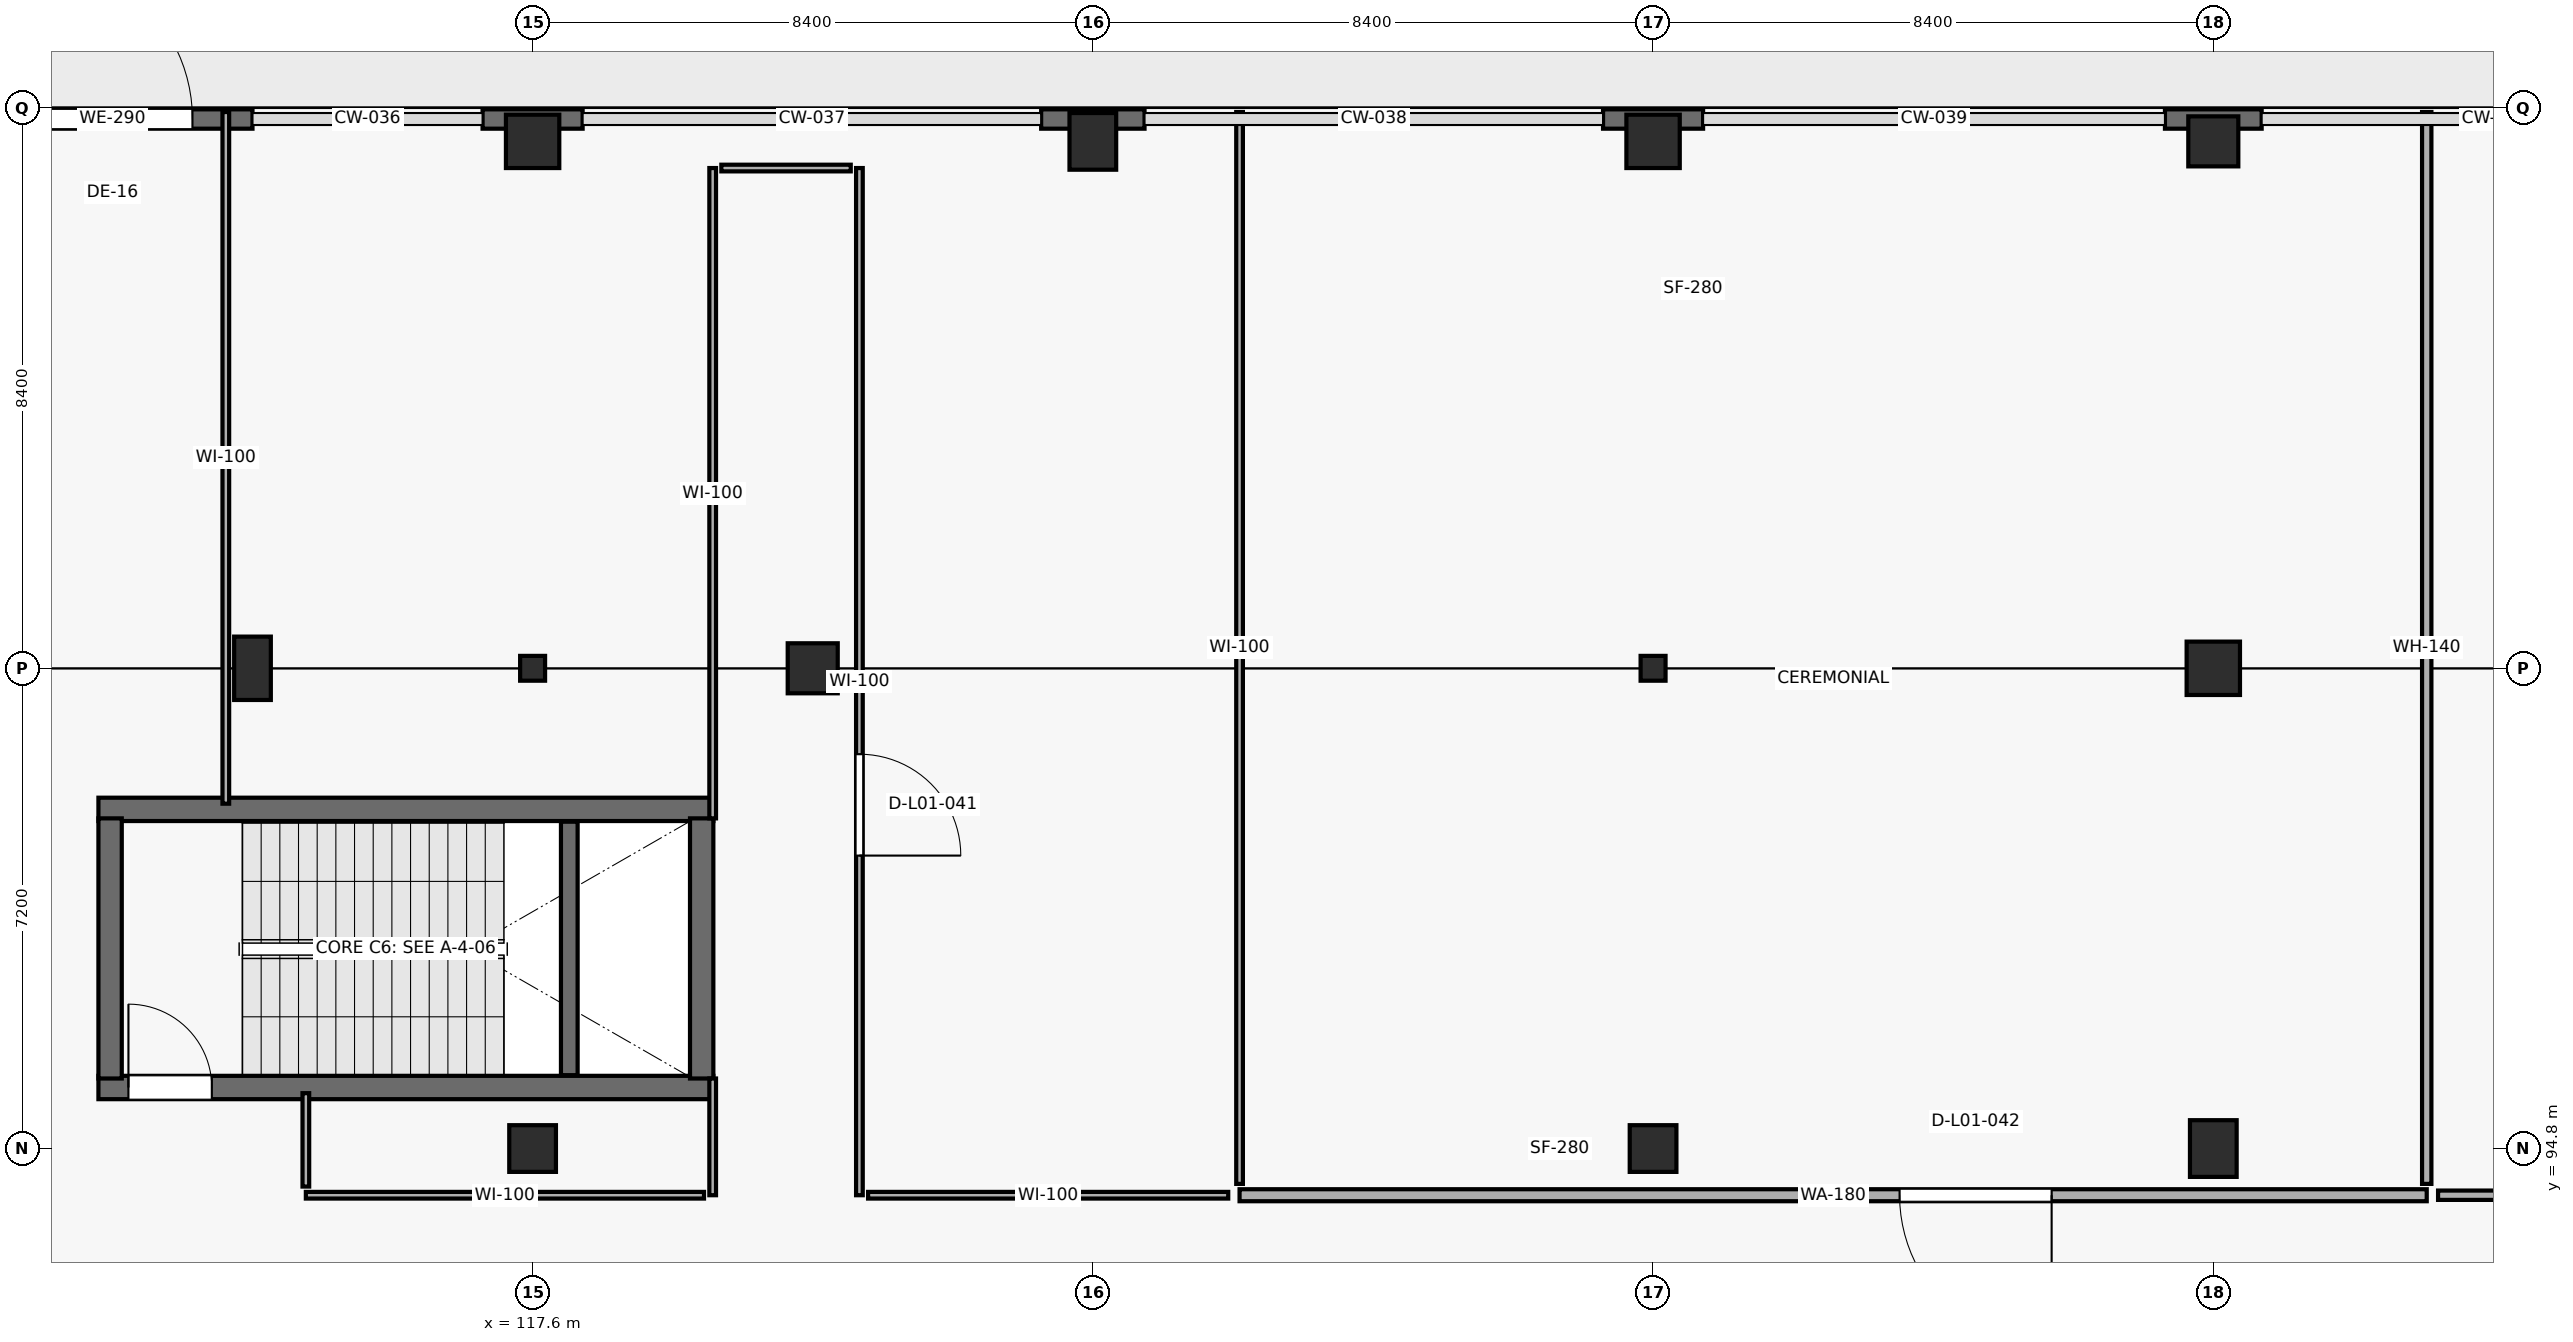
"""IFC4 building model, lengths in metres.
Left out: names, types, materials, properties, quantities, classifications, styles, units other than length and angle.
Written with IfcOpenShell. Run it as: python <this file> out.ifc"""

import sys

from ifc_helpers import new_model, si_unit, direction, frame, frame_2d, origin, origin_2d, place, context, subcontext, project, spatial, rectangle, circle, i_section, extrude, element, fill, save


model = new_model("IFC4")
c1 = context("Model", 3, precision=1e-05, world=origin(), true_north=direction((0.0, 1.0)))
c2 = subcontext(c1, "Body", "Model", "MODEL_VIEW")
j1 = project(units=[si_unit("LENGTHUNIT", "METRE"), si_unit("PLANEANGLEUNIT", "RADIAN")], contexts=[c1])
p1 = place(None, origin())
s1 = spatial("IfcSite", under=j1, at=p1, CompositionType="ELEMENT")
p2 = place(p1, origin())
s2 = spatial("IfcBuilding", under=s1, at=p2, CompositionType="ELEMENT")
p3 = place(p2, origin())
s3 = spatial("IfcBuildingStorey", under=s2, at=p3, CompositionType="ELEMENT", Elevation=0.0)
p4 = place(p3, frame((117.6, 94.8, 0.0), z_axis=(0.0, 0.0, 1.0), x_axis=(1.0, 0.0, 0.0)))
e1 = element("IfcColumn", 1, at=p4, inside=s3, PredefinedType="COLUMN", context=c2, shape_type="SweptSolid", body=[
    extrude(rectangle(XDim=0.7, YDim=0.7, at=origin_2d()), origin(), (0.0, 0.0, 1.0), 5.4),
])
p5 = place(p3, frame((117.6, 102.0, 0.0), z_axis=(0.0, 0.0, 1.0), x_axis=(1.0, 0.0, 0.0)))
e2 = element("IfcColumn", 2, at=p5, inside=s3, PredefinedType="COLUMN", context=c2, shape_type="SweptSolid", body=[
    extrude(i_section(OverallWidth=0.374, OverallDepth=0.372, WebThickness=0.016, FlangeThickness=0.026, at=origin_2d()), origin(), (0.0, 0.0, 1.0), 5.4),
])
p6 = place(p3, frame((117.6, 109.9, 0.0), z_axis=(0.0, 0.0, 1.0), x_axis=(1.0, 0.0, 0.0)))
e3 = element("IfcColumn", 3, at=p6, inside=s3, PredefinedType="COLUMN", context=c2, shape_type="SweptSolid", body=[
    extrude(rectangle(XDim=0.8, YDim=0.8, at=origin_2d()), origin(), (0.0, 0.0, 1.0), 5.4),
])
p7 = place(p3, frame((126.0, 109.9, 0.0), z_axis=(0.0, 0.0, 1.0), x_axis=(1.0, 0.0, 0.0)))
e4 = element("IfcColumn", 4, at=p7, inside=s3, PredefinedType="COLUMN", context=c2, shape_type="SweptSolid", body=[
    extrude(rectangle(XDim=0.7, YDim=0.85, at=origin_2d()), origin(), (0.0, 0.0, 1.0), 5.4),
])
p8 = place(p3, frame((134.4, 94.8, 0.0), z_axis=(0.0, 0.0, 1.0), x_axis=(1.0, 0.0, 0.0)))
e5 = element("IfcColumn", 5, at=p8, inside=s3, PredefinedType="COLUMN", context=c2, shape_type="SweptSolid", body=[
    extrude(rectangle(XDim=0.7, YDim=0.7, at=origin_2d()), origin(), (0.0, 0.0, 1.0), 5.4),
])
p9 = place(p3, frame((134.4, 102.0, 0.0), z_axis=(0.0, 0.0, 1.0), x_axis=(1.0, 0.0, 0.0)))
e6 = element("IfcColumn", 6, at=p9, inside=s3, PredefinedType="COLUMN", context=c2, shape_type="SweptSolid", body=[
    extrude(i_section(OverallWidth=0.374, OverallDepth=0.372, WebThickness=0.016, FlangeThickness=0.026, at=origin_2d()), origin(), (0.0, 0.0, 1.0), 5.4),
])
p10 = place(p3, frame((134.4, 109.9, 0.0), z_axis=(0.0, 0.0, 1.0), x_axis=(1.0, 0.0, 0.0)))
e7 = element("IfcColumn", 7, at=p10, inside=s3, PredefinedType="COLUMN", context=c2, shape_type="SweptSolid", body=[
    extrude(rectangle(XDim=0.8, YDim=0.8, at=origin_2d()), origin(), (0.0, 0.0, 1.0), 5.4),
])
p11 = place(p3, frame((142.8, 94.8, 0.0), z_axis=(0.0, 0.0, 1.0), x_axis=(1.0, 0.0, 0.0)))
e8 = element("IfcColumn", 8, at=p11, inside=s3, PredefinedType="COLUMN", context=c2, shape_type="SweptSolid", body=[
    extrude(rectangle(XDim=0.7, YDim=0.85, at=origin_2d()), origin(), (0.0, 0.0, 1.0), 5.4),
])
p12 = place(p3, frame((142.8, 102.0, 0.0), z_axis=(0.0, 0.0, 1.0), x_axis=(1.0, 0.0, 0.0)))
e9 = element("IfcColumn", 9, at=p12, inside=s3, PredefinedType="COLUMN", context=c2, shape_type="SweptSolid", body=[
    extrude(rectangle(XDim=0.8, YDim=0.8, at=origin_2d()), origin(), (0.0, 0.0, 1.0), 5.4),
])
p13 = place(p3, frame((142.8, 109.9, 0.0), z_axis=(0.0, 0.0, 1.0), x_axis=(1.0, 0.0, 0.0)))
e10 = element("IfcColumn", 10, at=p13, inside=s3, PredefinedType="COLUMN", context=c2, shape_type="SweptSolid", body=[
    extrude(rectangle(XDim=0.75, YDim=0.75, at=origin_2d()), origin(), (0.0, 0.0, 1.0), 5.4),
])
p14 = place(p3, frame((113.4, 102.0, 0.0), z_axis=(0.0, 0.0, 1.0), x_axis=(1.0, 0.0, 0.0)))
e11 = element("IfcColumn", 11, at=p14, inside=s3, PredefinedType="PILASTER", context=c2, shape_type="SweptSolid", body=[
    extrude(rectangle(XDim=0.55, YDim=0.95, at=origin_2d()), origin(), (0.0, 0.0, 1.0), 5.4),
])
p15 = place(p3, frame((121.8, 102.0, 0.0), z_axis=(0.0, 0.0, 1.0), x_axis=(1.0, 0.0, 0.0)))
e12 = element("IfcColumn", 12, at=p15, inside=s3, PredefinedType="PILASTER", context=c2, shape_type="SweptSolid", body=[
    extrude(circle(Radius=0.375, at=origin_2d()), origin(), (0.0, 0.0, 1.0), 5.4),
])
p16 = place(p3, frame((109.2, 110.235, 0.0), z_axis=(0.0, 0.0, 1.0), x_axis=(1.0, 0.0, 0.0)))
e13 = element("IfcWall", 13, at=p16, inside=s3, PredefinedType="SOLIDWALL", context=c2, shape_type="SweptSolid", body=[
    extrude(rectangle(XDim=4.2, YDim=0.29, at=frame_2d((2.1, 0.0))), origin(), (0.0, 0.0, 1.0), 5.12),
])
p17 = place(p16, frame((0.9, 0.0, 0.0)))
e14 = element("IfcOpeningElement", 14, at=p17, cuts=e13, PredefinedType="OPENING", context=c2, shape_type="SweptSolid", body=[
    extrude(rectangle(XDim=2.4, YDim=2.7, at=frame_2d((1.2, 1.35))), frame((0.0, 0.155, 0.0), z_axis=(0.0, -1.0, 0.0), x_axis=(1.0, 0.0, 0.0)), (0.0, 0.0, 1.0), 0.31),
])
p18 = place(p3, frame((116.85, 110.235, 0.0), z_axis=(0.0, 0.0, 1.0), x_axis=(1.0, 0.0, 0.0)))
e15 = element("IfcWall", 15, at=p18, inside=s3, PredefinedType="SOLIDWALL", context=c2, shape_type="SweptSolid", body=[
    extrude(rectangle(XDim=1.5, YDim=0.29, at=frame_2d((0.75, 0.0))), origin(), (0.0, 0.0, 1.0), 5.12),
])
p19 = place(p3, frame((125.225, 110.235, 0.0), z_axis=(0.0, 0.0, 1.0), x_axis=(1.0, 0.0, 0.0)))
e16 = element("IfcWall", 16, at=p19, inside=s3, PredefinedType="SOLIDWALL", context=c2, shape_type="SweptSolid", body=[
    extrude(rectangle(XDim=1.55, YDim=0.29, at=frame_2d((0.775, 0.0))), origin(), (0.0, 0.0, 1.0), 5.12),
])
p20 = place(p3, frame((133.65, 110.235, 0.0), z_axis=(0.0, 0.0, 1.0), x_axis=(1.0, 0.0, 0.0)))
e17 = element("IfcWall", 17, at=p20, inside=s3, PredefinedType="SOLIDWALL", context=c2, shape_type="SweptSolid", body=[
    extrude(rectangle(XDim=1.5, YDim=0.29, at=frame_2d((0.75, 0.0))), origin(), (0.0, 0.0, 1.0), 5.12),
])
p21 = place(p3, frame((142.075, 110.235, 0.0), z_axis=(0.0, 0.0, 1.0), x_axis=(1.0, 0.0, 0.0)))
e18 = element("IfcWall", 18, at=p21, inside=s3, PredefinedType="SOLIDWALL", context=c2, shape_type="SweptSolid", body=[
    extrude(rectangle(XDim=1.45, YDim=0.29, at=frame_2d((0.725, 0.0))), origin(), (0.0, 0.0, 1.0), 5.12),
])
p22 = place(p3, frame((111.09, 95.715, 0.0), z_axis=(0.0, 0.0, 1.0), x_axis=(1.0, 0.0, 0.0)))
e19 = element("IfcWall", 19, at=p22, inside=s3, PredefinedType="SHEAR", context=c2, shape_type="SweptSolid", body=[
    extrude(rectangle(XDim=9.22, YDim=0.35, at=frame_2d((4.61, 0.0))), origin(), (0.0, 0.0, 1.0), 5.12),
])
p23 = place(p22, frame((0.45, 0.0, 0.0)))
e20 = element("IfcOpeningElement", 20, at=p23, cuts=e19, PredefinedType="OPENING", context=c2, shape_type="SweptSolid", body=[
    extrude(rectangle(XDim=1.25, YDim=2.2, at=frame_2d((0.625, 1.1))), frame((0.0, 0.185, 0.0), z_axis=(0.0, -1.0, 0.0), x_axis=(1.0, 0.0, 0.0)), (0.0, 0.0, 1.0), 0.37),
])
p24 = place(p3, frame((120.31, 99.885, 0.0), z_axis=(0.0, 0.0, 1.0), x_axis=(-1.0, 0.0, 0.0)))
e21 = element("IfcWall", 21, at=p24, inside=s3, PredefinedType="SHEAR", context=c2, shape_type="SweptSolid", body=[
    extrude(rectangle(XDim=9.22, YDim=0.35, at=frame_2d((4.61, 0.0))), origin(), (0.0, 0.0, 1.0), 5.12),
])
for number, where, z_axis, x_axis in (
    (22, (111.265, 95.85, 0.0), (0.0, 0.0, 1.0), (0.0, 1.0, 0.0)),
    (23, (120.135, 99.75, 0.0), (0.0, 0.0, 1.0), (0.0, -1.0, 0.0)),
):
    element("IfcWall", number, at=place(p3, frame(where, z_axis=z_axis, x_axis=x_axis)), inside=s3, PredefinedType="SHEAR", context=c2, shape_type="SweptSolid", body=[
        extrude(rectangle(XDim=3.9, YDim=0.35, at=frame_2d((1.95, 0.0))), origin(), (0.0, 0.0, 1.0), 5.12),
    ])
p25 = place(p3, frame((118.15, 95.9, 0.0), z_axis=(0.0, 0.0, 1.0), x_axis=(0.0, 1.0, 0.0)))
e24 = element("IfcWall", 24, at=p25, inside=s3, PredefinedType="SHEAR", context=c2, shape_type="SweptSolid", body=[
    extrude(rectangle(XDim=3.8, YDim=0.25, at=frame_2d((1.9, 0.0))), origin(), (0.0, 0.0, 1.0), 2.52),
])
p26 = place(p3, frame((146.0, 94.1, 0.0), z_axis=(0.0, 0.0, 1.0), x_axis=(-1.0, 0.0, 0.0)))
e25 = element("IfcWall", 25, at=p26, inside=s3, PredefinedType="PARTITIONING", context=c2, shape_type="SweptSolid", body=[
    extrude(rectangle(XDim=17.8, YDim=0.18, at=frame_2d((8.9, 0.0))), origin(), (0.0, 0.0, 1.0), 5.12),
])
p27 = place(p26, frame((5.624, 0.0, 0.0)))
e26 = element("IfcOpeningElement", 26, at=p27, cuts=e25, PredefinedType="OPENING", context=c2, shape_type="SweptSolid", body=[
    extrude(rectangle(XDim=2.28, YDim=2.75, at=frame_2d((1.14, 1.375))), frame((0.0, 0.1, 0.0), z_axis=(0.0, -1.0, 0.0), x_axis=(1.0, 0.0, 0.0)), (0.0, 0.0, 1.0), 0.2),
])
p28 = place(p3, frame((146.0, 94.27, 0.0), z_axis=(0.0, 0.0, 1.0), x_axis=(0.0, 1.0, 0.0)))
e27 = element("IfcWall", 27, at=p28, inside=s3, PredefinedType="PARTITIONING", context=c2, shape_type="SweptSolid", body=[
    extrude(rectangle(XDim=16.07, YDim=0.14, at=frame_2d((8.035, 0.0))), origin(), (0.0, 0.0, 1.0), 5.12),
])
p29 = place(p3, frame((128.2, 110.34, 0.0), z_axis=(0.0, 0.0, 1.0), x_axis=(0.0, -1.0, 0.0)))
e28 = element("IfcWall", 28, at=p29, inside=s3, PredefinedType="PARTITIONING", context=c2, shape_type="SweptSolid", body=[
    extrude(rectangle(XDim=16.07, YDim=0.1, at=frame_2d((8.035, 0.0))), origin(), (0.0, 0.0, 1.0), 5.12),
])
p30 = place(p3, frame((122.5, 94.1, 0.0), z_axis=(0.0, 0.0, 1.0), x_axis=(0.0, 1.0, 0.0)))
e29 = element("IfcWall", 29, at=p30, inside=s3, PredefinedType="PARTITIONING", context=c2, shape_type="SweptSolid", body=[
    extrude(rectangle(XDim=15.4, YDim=0.1, at=frame_2d((7.7, 0.0))), origin(), (0.0, 0.0, 1.0), 5.12),
])
p31 = place(p30, frame((5.092, 0.0, 0.0)))
e30 = element("IfcOpeningElement", 30, at=p31, cuts=e29, PredefinedType="OPENING", context=c2, shape_type="SweptSolid", body=[
    extrude(rectangle(XDim=1.52, YDim=2.4, at=frame_2d((0.76, 1.2))), frame((0.0, 0.06, 0.0), z_axis=(0.0, -1.0, 0.0), x_axis=(1.0, 0.0, 0.0)), (0.0, 0.0, 1.0), 0.12),
])
p32 = place(p3, frame((120.3, 109.5, 0.0), z_axis=(0.0, 0.0, 1.0), x_axis=(0.0, -1.0, 0.0)))
e31 = element("IfcWall", 31, at=p32, inside=s3, PredefinedType="PARTITIONING", context=c2, shape_type="SweptSolid", body=[
    extrude(rectangle(XDim=9.75, YDim=0.1, at=frame_2d((4.875, 0.0))), origin(), (0.0, 0.0, 1.0), 5.12),
])
p33 = place(p3, frame((120.3, 95.85, 0.0), z_axis=(0.0, 0.0, 1.0), x_axis=(0.0, -1.0, 0.0)))
e32 = element("IfcWall", 32, at=p33, inside=s3, PredefinedType="PARTITIONING", context=c2, shape_type="SweptSolid", body=[
    extrude(rectangle(XDim=1.75, YDim=0.1, at=frame_2d((0.875, 0.0))), origin(), (0.0, 0.0, 1.0), 5.12),
])
p34 = place(p3, frame((159.4, 94.1, 0.0), z_axis=(0.0, 0.0, 1.0), x_axis=(-1.0, 0.0, 0.0)))
e33 = element("IfcWall", 33, at=p34, inside=s3, PredefinedType="PARTITIONING", context=c2, shape_type="SweptSolid", body=[
    extrude(rectangle(XDim=13.23, YDim=0.14, at=frame_2d((6.615, 0.0))), origin(), (0.0, 0.0, 1.0), 5.12),
])
p35 = place(p3, frame((113.0, 99.97, 0.0), z_axis=(0.0, 0.0, 1.0), x_axis=(0.0, 1.0, 0.0)))
e34 = element("IfcWall", 34, at=p35, inside=s3, PredefinedType="PARTITIONING", context=c2, shape_type="SweptSolid", body=[
    extrude(rectangle(XDim=10.37, YDim=0.1, at=frame_2d((5.185, 0.0))), origin(), (0.0, 0.0, 1.0), 5.12),
])
p36 = place(p3, frame((120.17, 94.1, 0.0), z_axis=(0.0, 0.0, 1.0), x_axis=(-1.0, 0.0, 0.0)))
e35 = element("IfcWall", 35, at=p36, inside=s3, PredefinedType="PARTITIONING", context=c2, shape_type="SweptSolid", body=[
    extrude(rectangle(XDim=5.97, YDim=0.1, at=frame_2d((2.985, 0.0))), origin(), (0.0, 0.0, 1.0), 5.12),
])
p37 = place(p3, frame((128.03, 94.1, 0.0), z_axis=(0.0, 0.0, 1.0), x_axis=(-1.0, 0.0, 0.0)))
e36 = element("IfcWall", 36, at=p37, inside=s3, PredefinedType="PARTITIONING", context=c2, shape_type="SweptSolid", body=[
    extrude(rectangle(XDim=5.4, YDim=0.1, at=frame_2d((2.7, 0.0))), origin(), (0.0, 0.0, 1.0), 5.12),
])
p38 = place(p3, frame((122.37, 109.5, 0.0), z_axis=(0.0, 0.0, 1.0), x_axis=(-1.0, 0.0, 0.0)))
e37 = element("IfcWall", 37, at=p38, inside=s3, PredefinedType="PARTITIONING", context=c2, shape_type="SweptSolid", body=[
    extrude(rectangle(XDim=1.94, YDim=0.1, at=frame_2d((0.97, 0.0))), origin(), (0.0, 0.0, 1.0), 4.36),
])
p39 = place(p3, frame((114.2, 94.23, 0.0), z_axis=(0.0, 0.0, 1.0), x_axis=(0.0, 1.0, 0.0)))
e38 = element("IfcWall", 38, at=p39, inside=s3, PredefinedType="PARTITIONING", context=c2, shape_type="SweptSolid", body=[
    extrude(rectangle(XDim=1.4, YDim=0.1, at=frame_2d((0.7, 0.0))), origin(), (0.0, 0.0, 1.0), 5.12),
])
p40 = place(p17, origin())
e39 = element("IfcDoor", 39, at=p40, inside=s3, OperationType="SINGLE_SWING_LEFT", PredefinedType="DOOR", context=c2, shape_type="SweptSolid", body=[
    extrude(rectangle(XDim=2.4, YDim=2.7, at=frame_2d((1.2, 1.35))), frame((0.0, 0.025, 0.0), z_axis=(0.0, -1.0, 0.0), x_axis=(1.0, 0.0, 0.0)), (0.0, 0.0, 1.0), 0.05),
])
fill(e14, e39)
p41 = place(p23, origin())
e40 = element("IfcDoor", 40, at=p41, inside=s3, OperationType="SINGLE_SWING_LEFT", PredefinedType="DOOR", context=c2, shape_type="SweptSolid", body=[
    extrude(rectangle(XDim=1.25, YDim=2.2, at=frame_2d((0.625, 1.1))), frame((0.0, 0.025, 0.0), z_axis=(0.0, -1.0, 0.0), x_axis=(1.0, 0.0, 0.0)), (0.0, 0.0, 1.0), 0.05),
])
fill(e20, e40)
p42 = place(p31, origin())
e41 = element("IfcDoor", 41, at=p42, inside=s3, OperationType="SINGLE_SWING_RIGHT", PredefinedType="DOOR", context=c2, shape_type="SweptSolid", body=[
    extrude(rectangle(XDim=1.52, YDim=2.4, at=frame_2d((0.76, 1.2))), frame((0.0, 0.025, 0.0), z_axis=(0.0, -1.0, 0.0), x_axis=(1.0, 0.0, 0.0)), (0.0, 0.0, 1.0), 0.05),
])
fill(e30, e41)
p43 = place(p27, origin())
e42 = element("IfcDoor", 42, at=p43, inside=s3, OperationType="SINGLE_SWING_LEFT", PredefinedType="DOOR", context=c2, shape_type="SweptSolid", body=[
    extrude(rectangle(XDim=2.28, YDim=2.75, at=frame_2d((1.14, 1.375))), frame((0.0, 0.025, 0.0), z_axis=(0.0, -1.0, 0.0), x_axis=(1.0, 0.0, 0.0)), (0.0, 0.0, 1.0), 0.05),
])
fill(e26, e42)
save(model, sys.argv[1])
